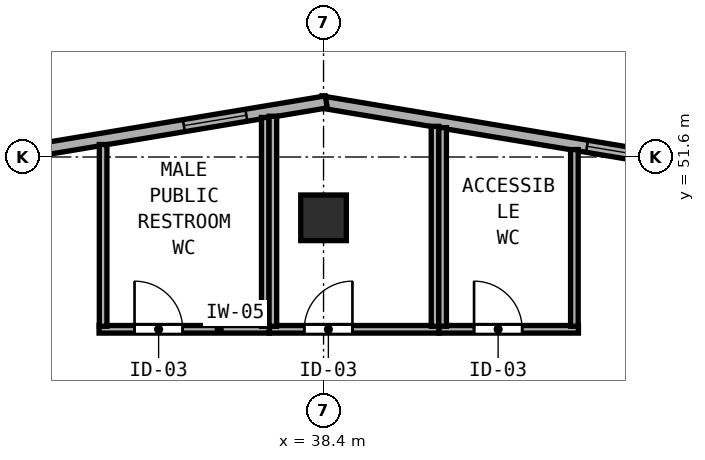
"""IFC4 building model, lengths in metres.
Left out: names, types, materials, properties, quantities, classifications, styles, units other than length and angle.
Written with IfcOpenShell. Run it as: python <this file> out.ifc"""

import sys

from ifc_helpers import new_model, si_unit, direction, frame, frame_2d, origin, origin_2d, place, context, subcontext, project, spatial, rectangle, hollow_rectangle, extrude, element, fill, save


model = new_model("IFC4")
c1 = context("Model", 3, precision=1e-05, world=origin(), true_north=direction((0.0, 1.0)))
c2 = subcontext(c1, "Body", "Model", "MODEL_VIEW")
j1 = project(units=[si_unit("LENGTHUNIT", "METRE"), si_unit("PLANEANGLEUNIT", "RADIAN")], contexts=[c1])
p1 = place(None, origin())
s1 = spatial("IfcSite", under=j1, at=p1, CompositionType="ELEMENT")
p2 = place(p1, origin())
s2 = spatial("IfcBuilding", under=s1, at=p2, CompositionType="ELEMENT")
p3 = place(p2, frame((0.0, 0.0, 94.0)))
s3 = spatial("IfcBuildingStorey", under=s2, at=p3, CompositionType="ELEMENT", Elevation=94.0)
p4 = place(p3, frame((38.4, 50.4, 0.0), z_axis=(0.0, 0.0, 1.0), x_axis=(1.0, 0.0, 0.0)))
e1 = element("IfcColumn", 1, at=p4, inside=s3, PredefinedType="COLUMN", context=c2, shape_type="SweptSolid", body=[
    extrude(hollow_rectangle(XDim=0.9, YDim=0.9, WallThickness=0.034, at=origin_2d()), origin(), (0.0, 0.0, 1.0), 4.4),
])
p5 = place(p3, frame((45.606, 51.477, 0.0), z_axis=(0.0, 0.0, 1.0), x_axis=(-0.986394820321, 0.164393608283, 0.0)))
e2 = element("IfcWall", 2, at=p5, inside=s3, PredefinedType="SOLIDWALL", context=c2, shape_type="SweptSolid", body=[
    extrude(rectangle(XDim=7.36, YDim=0.24, at=frame_2d((3.68, 0.0))), origin(), (0.0, 0.0, 1.0), 4.2),
])
p6 = place(p5, frame((0.784, 0.0, 0.85)))
e3 = element("IfcOpeningElement", 3, at=p6, cuts=e2, PredefinedType="OPENING", context=c2, shape_type="SweptSolid", body=[
    extrude(rectangle(XDim=1.25, YDim=1.95, at=frame_2d((0.625, 0.975))), frame((0.0, 0.13, 0.0), z_axis=(0.0, -1.0, 0.0), x_axis=(1.0, 0.0, 0.0)), (0.0, 0.0, 1.0), 0.26),
])
p7 = place(p3, frame((38.454, 52.687, 0.0), z_axis=(0.0, 0.0, 1.0), x_axis=(-0.986394820321, -0.164393608283, 0.0)))
e4 = element("IfcWall", 4, at=p7, inside=s3, PredefinedType="SOLIDWALL", context=c2, shape_type="SweptSolid", body=[
    extrude(rectangle(XDim=7.36, YDim=0.24, at=frame_2d((3.68, 0.0))), origin(), (0.0, 0.0, 1.0), 4.2),
])
p8 = place(p7, frame((1.6, 0.0, 0.85)))
e5 = element("IfcOpeningElement", 5, at=p8, cuts=e4, PredefinedType="OPENING", context=c2, shape_type="SweptSolid", body=[
    extrude(rectangle(XDim=1.25, YDim=1.95, at=frame_2d((0.625, 0.975))), frame((0.0, 0.13, 0.0), z_axis=(0.0, -1.0, 0.0), x_axis=(1.0, 0.0, 0.0)), (0.0, 0.0, 1.0), 0.26),
])
p9 = place(p3, frame((33.97, 48.2, 0.0), z_axis=(0.0, 0.0, 1.0), x_axis=(1.0, 0.0, 0.0)))
e6 = element("IfcWall", 6, at=p9, inside=s3, PredefinedType="PARTITIONING", context=c2, shape_type="SweptSolid", body=[
    extrude(rectangle(XDim=3.36, YDim=0.15, at=frame_2d((1.68, 0.0))), origin(), (0.0, 0.0, 1.0), 4.2),
])
p10 = place(p9, frame((0.7, 0.0, 0.0)))
e7 = element("IfcOpeningElement", 7, at=p10, cuts=e6, PredefinedType="OPENING", context=c2, shape_type="SweptSolid", body=[
    extrude(rectangle(XDim=0.95, YDim=2.12, at=frame_2d((0.475, 1.06))), frame((0.0, 0.085, 0.0), z_axis=(0.0, -1.0, 0.0), x_axis=(1.0, 0.0, 0.0)), (0.0, 0.0, 1.0), 0.17),
])
p11 = place(p3, frame((34.05, 48.26, 0.0), z_axis=(0.0, 0.0, 1.0), x_axis=(0.0, 1.0, 0.0)))
e8 = element("IfcWall", 8, at=p11, inside=s3, PredefinedType="PARTITIONING", context=c2, shape_type="SweptSolid", body=[
    extrude(rectangle(XDim=3.587, YDim=0.15, at=frame_2d((1.793, 0.0))), origin(), (0.0, 0.0, 1.0), 4.2),
])
p12 = place(p3, frame((37.25, 48.26, 0.0), z_axis=(0.0, 0.0, 1.0), x_axis=(0.0, 1.0, 0.0)))
e9 = element("IfcWall", 9, at=p12, inside=s3, PredefinedType="PARTITIONING", context=c2, shape_type="SweptSolid", body=[
    extrude(rectangle(XDim=4.12, YDim=0.15, at=frame_2d((2.06, 0.0))), origin(), (0.0, 0.0, 1.0), 4.2),
])
p13 = place(p3, frame((37.332, 48.2, 0.0), z_axis=(0.0, 0.0, 1.0), x_axis=(1.0, 0.0, 0.0)))
e10 = element("IfcWall", 10, at=p13, inside=s3, PredefinedType="PARTITIONING", context=c2, shape_type="SweptSolid", body=[
    extrude(rectangle(XDim=3.348, YDim=0.15, at=frame_2d((1.674, 0.0))), origin(), (0.0, 0.0, 1.0), 4.2),
])
p14 = place(p13, frame((0.688, 0.0, 0.0)))
e11 = element("IfcOpeningElement", 11, at=p14, cuts=e10, PredefinedType="OPENING", context=c2, shape_type="SweptSolid", body=[
    extrude(rectangle(XDim=0.95, YDim=2.12, at=frame_2d((0.475, 1.06))), frame((0.0, 0.085, 0.0), z_axis=(0.0, -1.0, 0.0), x_axis=(1.0, 0.0, 0.0)), (0.0, 0.0, 1.0), 0.17),
])
p15 = place(p3, frame((37.4, 48.26, 0.0), z_axis=(0.0, 0.0, 1.0), x_axis=(0.0, 1.0, 0.0)))
e12 = element("IfcWall", 12, at=p15, inside=s3, PredefinedType="PARTITIONING", context=c2, shape_type="SweptSolid", body=[
    extrude(rectangle(XDim=4.145, YDim=0.15, at=frame_2d((2.073, 0.0))), origin(), (0.0, 0.0, 1.0), 4.2),
])
p16 = place(p3, frame((40.6, 48.26, 0.0), z_axis=(0.0, 0.0, 1.0), x_axis=(0.0, 1.0, 0.0)))
e13 = element("IfcWall", 13, at=p16, inside=s3, PredefinedType="PARTITIONING", context=c2, shape_type="SweptSolid", body=[
    extrude(rectangle(XDim=3.945, YDim=0.15, at=frame_2d((1.973, 0.0))), origin(), (0.0, 0.0, 1.0), 4.2),
])
p17 = place(p3, frame((40.682, 48.2, 0.0), z_axis=(0.0, 0.0, 1.0), x_axis=(1.0, 0.0, 0.0)))
e14 = element("IfcWall", 14, at=p17, inside=s3, PredefinedType="PARTITIONING", context=c2, shape_type="SweptSolid", body=[
    extrude(rectangle(XDim=2.748, YDim=0.15, at=frame_2d((1.374, 0.0))), origin(), (0.0, 0.0, 1.0), 4.2),
])
p18 = place(p17, frame((0.688, 0.0, 0.0)))
e15 = element("IfcOpeningElement", 15, at=p18, cuts=e14, PredefinedType="OPENING", context=c2, shape_type="SweptSolid", body=[
    extrude(rectangle(XDim=0.95, YDim=2.12, at=frame_2d((0.475, 1.06))), frame((0.0, 0.085, 0.0), z_axis=(0.0, -1.0, 0.0), x_axis=(1.0, 0.0, 0.0)), (0.0, 0.0, 1.0), 0.17),
])
p19 = place(p3, frame((40.75, 48.26, 0.0), z_axis=(0.0, 0.0, 1.0), x_axis=(0.0, 1.0, 0.0)))
e16 = element("IfcWall", 16, at=p19, inside=s3, PredefinedType="PARTITIONING", context=c2, shape_type="SweptSolid", body=[
    extrude(rectangle(XDim=3.92, YDim=0.15, at=frame_2d((1.96, 0.0))), origin(), (0.0, 0.0, 1.0), 4.2),
])
p20 = place(p3, frame((43.35, 48.26, 0.0), z_axis=(0.0, 0.0, 1.0), x_axis=(0.0, 1.0, 0.0)))
e17 = element("IfcWall", 17, at=p20, inside=s3, PredefinedType="PARTITIONING", context=c2, shape_type="SweptSolid", body=[
    extrude(rectangle(XDim=3.487, YDim=0.15, at=frame_2d((1.743, 0.0))), origin(), (0.0, 0.0, 1.0), 4.2),
])
p21 = place(p6, origin())
e18 = element("IfcWindow", 18, at=p21, inside=s3, PartitioningType="SINGLE_PANEL", PredefinedType="WINDOW", context=c2, shape_type="SweptSolid", body=[
    extrude(rectangle(XDim=1.25, YDim=1.95, at=frame_2d((0.625, 0.975))), frame((0.0, 0.03, 0.0), z_axis=(0.0, -1.0, 0.0), x_axis=(1.0, 0.0, 0.0)), (0.0, 0.0, 1.0), 0.06),
])
fill(e3, e18)
p22 = place(p8, origin())
e19 = element("IfcWindow", 19, at=p22, inside=s3, PartitioningType="SINGLE_PANEL", PredefinedType="WINDOW", context=c2, shape_type="SweptSolid", body=[
    extrude(rectangle(XDim=1.25, YDim=1.95, at=frame_2d((0.625, 0.975))), frame((0.0, 0.03, 0.0), z_axis=(0.0, -1.0, 0.0), x_axis=(1.0, 0.0, 0.0)), (0.0, 0.0, 1.0), 0.06),
])
fill(e5, e19)
p23 = place(p10, origin())
e20 = element("IfcDoor", 20, at=p23, inside=s3, OperationType="SINGLE_SWING_LEFT", PredefinedType="DOOR", context=c2, shape_type="SweptSolid", body=[
    extrude(rectangle(XDim=0.95, YDim=2.12, at=frame_2d((0.475, 1.06))), frame((0.0, 0.025, 0.0), z_axis=(0.0, -1.0, 0.0), x_axis=(1.0, 0.0, 0.0)), (0.0, 0.0, 1.0), 0.05),
])
fill(e7, e20)
p24 = place(p14, origin())
e21 = element("IfcDoor", 21, at=p24, inside=s3, OperationType="SINGLE_SWING_RIGHT", PredefinedType="DOOR", context=c2, shape_type="SweptSolid", body=[
    extrude(rectangle(XDim=0.95, YDim=2.12, at=frame_2d((0.475, 1.06))), frame((0.0, 0.025, 0.0), z_axis=(0.0, -1.0, 0.0), x_axis=(1.0, 0.0, 0.0)), (0.0, 0.0, 1.0), 0.05),
])
fill(e11, e21)
p25 = place(p18, origin())
e22 = element("IfcDoor", 22, at=p25, inside=s3, OperationType="SINGLE_SWING_LEFT", PredefinedType="DOOR", context=c2, shape_type="SweptSolid", body=[
    extrude(rectangle(XDim=0.95, YDim=2.12, at=frame_2d((0.475, 1.06))), frame((0.0, 0.025, 0.0), z_axis=(0.0, -1.0, 0.0), x_axis=(1.0, 0.0, 0.0)), (0.0, 0.0, 1.0), 0.05),
])
fill(e15, e22)
save(model, sys.argv[1])
